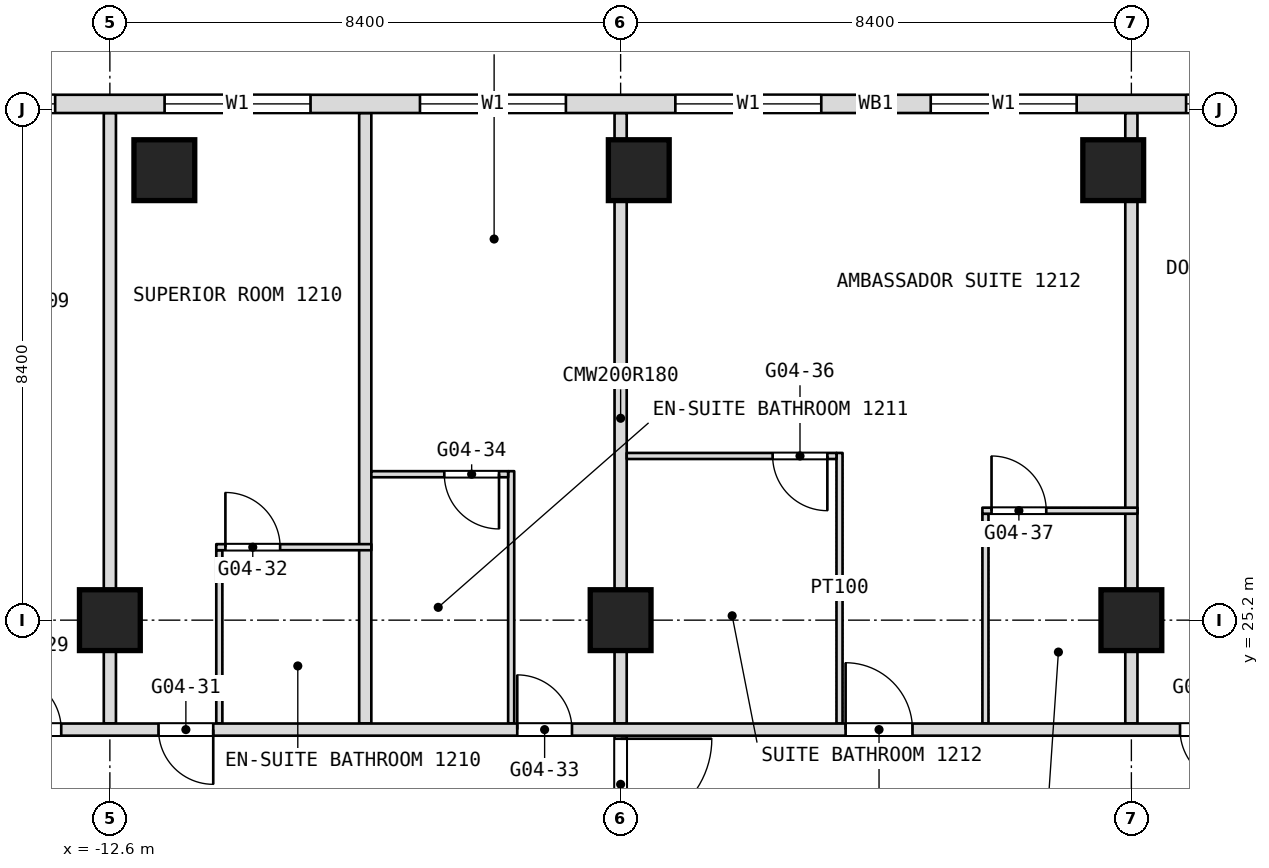
"""IFC4 building model, lengths in metres.
Left out: names, types, materials, properties, quantities, classifications, styles, units other than length and angle.
Written with IfcOpenShell. Run it as: python <this file> out.ifc"""

import sys

from ifc_helpers import new_model, si_unit, direction, frame, frame_2d, origin, origin_2d, place, context, subcontext, project, spatial, rectangle, extrude, element, fill, save


model = new_model("IFC4")
c1 = context("Model", 3, precision=1e-05, world=origin(), true_north=direction((0.0, 1.0)))
c2 = subcontext(c1, "Body", "Model", "MODEL_VIEW")
j1 = project(units=[si_unit("LENGTHUNIT", "METRE"), si_unit("PLANEANGLEUNIT", "RADIAN")], contexts=[c1])
p1 = place(None, origin())
s1 = spatial("IfcSite", under=j1, at=p1, CompositionType="ELEMENT")
p2 = place(p1, origin())
s2 = spatial("IfcBuilding", under=s1, at=p2, CompositionType="ELEMENT")
p3 = place(p2, frame((0.0, 0.0, 58.1)))
s3 = spatial("IfcBuildingStorey", under=s2, at=p3, CompositionType="ELEMENT", Elevation=58.1)
for number, where, z_axis, x_axis in (
    (1, (-12.6, 25.2, 0.0), (0.0, 0.0, 1.0), (1.0, 0.0, 0.0)),
    (2, (-4.2, 25.2, 0.0), (0.0, 0.0, 1.0), (1.0, 0.0, 0.0)),
    (3, (4.2, 25.2, 0.0), (0.0, 0.0, 1.0), (1.0, 0.0, 0.0)),
    (4, (-11.704, 32.6, 0.0), (0.0, 0.0, 1.0), (1.0, 0.0, 0.0)),
    (5, (-3.901, 32.6, 0.0), (0.0, 0.0, 1.0), (1.0, 0.0, 0.0)),
    (6, (3.901, 32.6, 0.0), (0.0, 0.0, 1.0), (1.0, 0.0, 0.0)),
):
    element("IfcColumn", number, at=place(p3, frame(where, z_axis=z_axis, x_axis=x_axis)), inside=s3, PredefinedType="COLUMN", context=c2, shape_type="SweptSolid", body=[
        extrude(rectangle(XDim=1.0, YDim=1.0, at=origin_2d()), origin(), (0.0, 0.0, 1.0), 3.6),
    ])
p4 = place(p3, frame((4.2, 23.5, 0.0), z_axis=(0.0, 0.0, 1.0), x_axis=(0.0, 1.0, 0.0)))
e7 = element("IfcWall", 7, at=p4, inside=s3, PredefinedType="PARTITIONING", context=c2, shape_type="SweptSolid", body=[
    extrude(rectangle(XDim=10.04, YDim=0.2, at=frame_2d((5.02, 0.0))), origin(), (0.0, 0.0, 1.0), 3.34),
])
p5 = place(p3, frame((1.8, 23.5, 0.0), z_axis=(0.0, 0.0, 1.0), x_axis=(0.0, 1.0, 0.0)))
e8 = element("IfcWall", 8, at=p5, inside=s3, PredefinedType="PARTITIONING", context=c2, shape_type="SweptSolid", body=[
    extrude(rectangle(XDim=3.45, YDim=0.1, at=frame_2d((1.725, 0.0))), origin(), (0.0, 0.0, 1.0), 3.34),
])
p6 = place(p3, frame((-0.6, 23.5, 0.0), z_axis=(0.0, 0.0, 1.0), x_axis=(0.0, 1.0, 0.0)))
e9 = element("IfcWall", 9, at=p6, inside=s3, PredefinedType="PARTITIONING", context=c2, shape_type="SweptSolid", body=[
    extrude(rectangle(XDim=4.45, YDim=0.1, at=frame_2d((2.225, 0.0))), origin(), (0.0, 0.0, 1.0), 3.34),
])
p7 = place(p3, frame((-4.2, 16.8, 0.0), z_axis=(0.0, 0.0, 1.0), x_axis=(0.0, 1.0, 0.0)))
e10 = element("IfcWall", 10, at=p7, inside=s3, PredefinedType="PARTITIONING", context=c2, shape_type="SweptSolid", body=[
    extrude(rectangle(XDim=6.7, YDim=0.2, at=frame_2d((3.35, 0.0))), origin(), (0.0, 0.0, 1.0), 3.34),
])
p8 = place(p7, frame((0.15, 0.0, 0.0)))
e11 = element("IfcOpeningElement", 11, at=p8, cuts=e10, PredefinedType="OPENING", context=c2, shape_type="SweptSolid", body=[
    extrude(rectangle(XDim=1.5, YDim=2.1, at=frame_2d((0.75, 1.05))), frame((0.0, 0.1, 0.0), z_axis=(0.0, -1.0, 0.0), x_axis=(1.0, 0.0, 0.0)), (0.0, 0.0, 1.0), 0.2),
])
p9 = place(p7, frame((4.95, 0.0, 0.0)))
e12 = element("IfcOpeningElement", 12, at=p9, cuts=e10, PredefinedType="OPENING", context=c2, shape_type="SweptSolid", body=[
    extrude(rectangle(XDim=1.5, YDim=2.1, at=frame_2d((0.75, 1.05))), frame((0.0, 0.1, 0.0), z_axis=(0.0, -1.0, 0.0), x_axis=(1.0, 0.0, 0.0)), (0.0, 0.0, 1.0), 0.2),
])
p10 = place(p3, frame((-4.2, 23.5, 0.0), z_axis=(0.0, 0.0, 1.0), x_axis=(0.0, 1.0, 0.0)))
e13 = element("IfcWall", 13, at=p10, inside=s3, PredefinedType="PARTITIONING", context=c2, shape_type="SweptSolid", body=[
    extrude(rectangle(XDim=10.04, YDim=0.2, at=frame_2d((5.02, 0.0))), origin(), (0.0, 0.0, 1.0), 3.34),
])
p11 = place(p3, frame((-6.0, 23.5, 0.0), z_axis=(0.0, 0.0, 1.0), x_axis=(0.0, 1.0, 0.0)))
e14 = element("IfcWall", 14, at=p11, inside=s3, PredefinedType="PARTITIONING", context=c2, shape_type="SweptSolid", body=[
    extrude(rectangle(XDim=4.15, YDim=0.1, at=frame_2d((2.075, 0.0))), origin(), (0.0, 0.0, 1.0), 3.34),
])
p12 = place(p3, frame((-8.4, 23.5, 0.0), z_axis=(0.0, 0.0, 1.0), x_axis=(0.0, 1.0, 0.0)))
e15 = element("IfcWall", 15, at=p12, inside=s3, PredefinedType="PARTITIONING", context=c2, shape_type="SweptSolid", body=[
    extrude(rectangle(XDim=10.04, YDim=0.2, at=frame_2d((5.02, 0.0))), origin(), (0.0, 0.0, 1.0), 3.34),
])
p13 = place(p3, frame((-10.8, 23.5, 0.0), z_axis=(0.0, 0.0, 1.0), x_axis=(0.0, 1.0, 0.0)))
e16 = element("IfcWall", 16, at=p13, inside=s3, PredefinedType="PARTITIONING", context=c2, shape_type="SweptSolid", body=[
    extrude(rectangle(XDim=2.85, YDim=0.1, at=frame_2d((1.425, 0.0))), origin(), (0.0, 0.0, 1.0), 3.34),
])
p14 = place(p3, frame((-12.6, 23.5, 0.0), z_axis=(0.0, 0.0, 1.0), x_axis=(0.0, 1.0, 0.0)))
e17 = element("IfcWall", 17, at=p14, inside=s3, PredefinedType="PARTITIONING", context=c2, shape_type="SweptSolid", body=[
    extrude(rectangle(XDim=10.04, YDim=0.2, at=frame_2d((5.02, 0.0))), origin(), (0.0, 0.0, 1.0), 3.34),
])
p15 = place(p3, frame((-16.7, 23.4, 0.0), z_axis=(0.0, 0.0, 1.0), x_axis=(1.0, 0.0, 0.0)))
e18 = element("IfcWall", 18, at=p15, inside=s3, PredefinedType="PARTITIONING", context=c2, shape_type="SweptSolid", body=[
    extrude(rectangle(XDim=23.4, YDim=0.2, at=frame_2d((11.7, 0.0))), origin(), (0.0, 0.0, 1.0), 3.34),
])
p16 = place(p15, frame((2.4, 0.0, 0.0)))
e19 = element("IfcOpeningElement", 19, at=p16, cuts=e18, PredefinedType="OPENING", context=c2, shape_type="SweptSolid", body=[
    extrude(rectangle(XDim=0.9, YDim=2.1, at=frame_2d((0.45, 1.05))), frame((0.0, 0.1, 0.0), z_axis=(0.0, -1.0, 0.0), x_axis=(1.0, 0.0, 0.0)), (0.0, 0.0, 1.0), 0.2),
])
p17 = place(p15, frame((4.9, 0.0, 0.0)))
e20 = element("IfcOpeningElement", 20, at=p17, cuts=e18, PredefinedType="OPENING", context=c2, shape_type="SweptSolid", body=[
    extrude(rectangle(XDim=0.9, YDim=2.1, at=frame_2d((0.45, 1.05))), frame((0.0, 0.1, 0.0), z_axis=(0.0, -1.0, 0.0), x_axis=(1.0, 0.0, 0.0)), (0.0, 0.0, 1.0), 0.2),
])
p18 = place(p15, frame((10.8, 0.0, 0.0)))
e21 = element("IfcOpeningElement", 21, at=p18, cuts=e18, PredefinedType="OPENING", context=c2, shape_type="SweptSolid", body=[
    extrude(rectangle(XDim=0.9, YDim=2.1, at=frame_2d((0.45, 1.05))), frame((0.0, 0.1, 0.0), z_axis=(0.0, -1.0, 0.0), x_axis=(1.0, 0.0, 0.0)), (0.0, 0.0, 1.0), 0.2),
])
p19 = place(p15, frame((16.2, 0.0, 0.0)))
e22 = element("IfcOpeningElement", 22, at=p19, cuts=e18, PredefinedType="OPENING", context=c2, shape_type="SweptSolid", body=[
    extrude(rectangle(XDim=1.1, YDim=2.1, at=frame_2d((0.55, 1.05))), frame((0.0, 0.1, 0.0), z_axis=(0.0, -1.0, 0.0), x_axis=(1.0, 0.0, 0.0)), (0.0, 0.0, 1.0), 0.2),
])
p20 = place(p15, frame((21.7, 0.0, 0.0)))
e23 = element("IfcOpeningElement", 23, at=p20, cuts=e18, PredefinedType="OPENING", context=c2, shape_type="SweptSolid", body=[
    extrude(rectangle(XDim=0.9, YDim=2.1, at=frame_2d((0.45, 1.05))), frame((0.0, 0.1, 0.0), z_axis=(0.0, -1.0, 0.0), x_axis=(1.0, 0.0, 0.0)), (0.0, 0.0, 1.0), 0.2),
])
p21 = place(p3, frame((-10.85, 26.4, 0.0), z_axis=(0.0, 0.0, 1.0), x_axis=(1.0, 0.0, 0.0)))
e24 = element("IfcWall", 24, at=p21, inside=s3, PredefinedType="PARTITIONING", context=c2, shape_type="SweptSolid", body=[
    extrude(rectangle(XDim=2.55, YDim=0.1, at=frame_2d((1.275, 0.0))), origin(), (0.0, 0.0, 1.0), 3.34),
])
p22 = place(p21, frame((0.15, 0.0, 0.0)))
e25 = element("IfcOpeningElement", 25, at=p22, cuts=e24, PredefinedType="OPENING", context=c2, shape_type="SweptSolid", body=[
    extrude(rectangle(XDim=0.9, YDim=2.1, at=frame_2d((0.45, 1.05))), frame((0.0, 0.05, 0.0), z_axis=(0.0, -1.0, 0.0), x_axis=(1.0, 0.0, 0.0)), (0.0, 0.0, 1.0), 0.1),
])
p23 = place(p3, frame((1.75, 27.0, 0.0), z_axis=(0.0, 0.0, 1.0), x_axis=(1.0, 0.0, 0.0)))
e26 = element("IfcWall", 26, at=p23, inside=s3, PredefinedType="PARTITIONING", context=c2, shape_type="SweptSolid", body=[
    extrude(rectangle(XDim=2.55, YDim=0.1, at=frame_2d((1.275, 0.0))), origin(), (0.0, 0.0, 1.0), 3.34),
])
p24 = place(p23, frame((0.15, 0.0, 0.0)))
e27 = element("IfcOpeningElement", 27, at=p24, cuts=e26, PredefinedType="OPENING", context=c2, shape_type="SweptSolid", body=[
    extrude(rectangle(XDim=0.9, YDim=2.1, at=frame_2d((0.45, 1.05))), frame((0.0, 0.05, 0.0), z_axis=(0.0, -1.0, 0.0), x_axis=(1.0, 0.0, 0.0)), (0.0, 0.0, 1.0), 0.1),
])
p25 = place(p3, frame((-8.3, 27.6, 0.0), z_axis=(0.0, 0.0, 1.0), x_axis=(1.0, 0.0, 0.0)))
e28 = element("IfcWall", 28, at=p25, inside=s3, PredefinedType="PARTITIONING", context=c2, shape_type="SweptSolid", body=[
    extrude(rectangle(XDim=2.25, YDim=0.1, at=frame_2d((1.125, 0.0))), origin(), (0.0, 0.0, 1.0), 3.34),
])
p26 = place(p25, frame((1.2, 0.0, 0.0)))
e29 = element("IfcOpeningElement", 29, at=p26, cuts=e28, PredefinedType="OPENING", context=c2, shape_type="SweptSolid", body=[
    extrude(rectangle(XDim=0.9, YDim=2.1, at=frame_2d((0.45, 1.05))), frame((0.0, 0.05, 0.0), z_axis=(0.0, -1.0, 0.0), x_axis=(1.0, 0.0, 0.0)), (0.0, 0.0, 1.0), 0.1),
])
p27 = place(p3, frame((-4.1, 27.9, 0.0), z_axis=(0.0, 0.0, 1.0), x_axis=(1.0, 0.0, 0.0)))
e30 = element("IfcWall", 30, at=p27, inside=s3, PredefinedType="PARTITIONING", context=c2, shape_type="SweptSolid", body=[
    extrude(rectangle(XDim=3.45, YDim=0.1, at=frame_2d((1.725, 0.0))), origin(), (0.0, 0.0, 1.0), 3.34),
])
p28 = place(p27, frame((2.4, 0.0, 0.0)))
e31 = element("IfcOpeningElement", 31, at=p28, cuts=e30, PredefinedType="OPENING", context=c2, shape_type="SweptSolid", body=[
    extrude(rectangle(XDim=0.9, YDim=2.1, at=frame_2d((0.45, 1.05))), frame((0.0, 0.05, 0.0), z_axis=(0.0, -1.0, 0.0), x_axis=(1.0, 0.0, 0.0)), (0.0, 0.0, 1.0), 0.1),
])
p29 = place(p3, frame((23.406, 33.69, 0.0), z_axis=(0.0, 0.0, 1.0), x_axis=(-1.0, 0.0, 0.0)))
e32 = element("IfcWall", 32, at=p29, inside=s3, PredefinedType="NOTDEFINED", context=c2, shape_type="SweptSolid", body=[
    extrude(rectangle(XDim=46.812, YDim=0.3, at=frame_2d((23.406, 0.0))), origin(), (0.0, 0.0, 1.0), 3.6),
])
p30 = place(p29, frame((2.186, 0.0, 0.9)))
e33 = element("IfcOpeningElement", 33, at=p30, cuts=e32, PredefinedType="OPENING", context=c2, shape_type="SweptSolid", body=[
    extrude(rectangle(XDim=2.4, YDim=2.1, at=frame_2d((1.2, 1.05))), frame((0.0, 0.15, 0.0), z_axis=(0.0, -1.0, 0.0), x_axis=(1.0, 0.0, 0.0)), (0.0, 0.0, 1.0), 0.3),
])
p31 = place(p29, frame((7.506, 0.0, 0.9)))
e34 = element("IfcOpeningElement", 34, at=p31, cuts=e32, PredefinedType="OPENING", context=c2, shape_type="SweptSolid", body=[
    extrude(rectangle(XDim=2.4, YDim=2.1, at=frame_2d((1.2, 1.05))), frame((0.0, 0.15, 0.0), z_axis=(0.0, -1.0, 0.0), x_axis=(1.0, 0.0, 0.0)), (0.0, 0.0, 1.0), 0.3),
])
p32 = place(p29, frame((11.706, 0.0, 0.9)))
e35 = element("IfcOpeningElement", 35, at=p32, cuts=e32, PredefinedType="OPENING", context=c2, shape_type="SweptSolid", body=[
    extrude(rectangle(XDim=2.4, YDim=2.1, at=frame_2d((1.2, 1.05))), frame((0.0, 0.15, 0.0), z_axis=(0.0, -1.0, 0.0), x_axis=(1.0, 0.0, 0.0)), (0.0, 0.0, 1.0), 0.3),
])
p33 = place(p29, frame((15.906, 0.0, 0.9)))
e36 = element("IfcOpeningElement", 36, at=p33, cuts=e32, PredefinedType="OPENING", context=c2, shape_type="SweptSolid", body=[
    extrude(rectangle(XDim=2.4, YDim=2.1, at=frame_2d((1.2, 1.05))), frame((0.0, 0.15, 0.0), z_axis=(0.0, -1.0, 0.0), x_axis=(1.0, 0.0, 0.0)), (0.0, 0.0, 1.0), 0.3),
])
p34 = place(p29, frame((20.106, 0.0, 0.9)))
e37 = element("IfcOpeningElement", 37, at=p34, cuts=e32, PredefinedType="OPENING", context=c2, shape_type="SweptSolid", body=[
    extrude(rectangle(XDim=2.4, YDim=2.1, at=frame_2d((1.2, 1.05))), frame((0.0, 0.15, 0.0), z_axis=(0.0, -1.0, 0.0), x_axis=(1.0, 0.0, 0.0)), (0.0, 0.0, 1.0), 0.3),
])
p35 = place(p29, frame((24.306, 0.0, 0.9)))
e38 = element("IfcOpeningElement", 38, at=p35, cuts=e32, PredefinedType="OPENING", context=c2, shape_type="SweptSolid", body=[
    extrude(rectangle(XDim=2.4, YDim=2.1, at=frame_2d((1.2, 1.05))), frame((0.0, 0.15, 0.0), z_axis=(0.0, -1.0, 0.0), x_axis=(1.0, 0.0, 0.0)), (0.0, 0.0, 1.0), 0.3),
])
p36 = place(p29, frame((28.506, 0.0, 0.9)))
e39 = element("IfcOpeningElement", 39, at=p36, cuts=e32, PredefinedType="OPENING", context=c2, shape_type="SweptSolid", body=[
    extrude(rectangle(XDim=2.4, YDim=2.1, at=frame_2d((1.2, 1.05))), frame((0.0, 0.15, 0.0), z_axis=(0.0, -1.0, 0.0), x_axis=(1.0, 0.0, 0.0)), (0.0, 0.0, 1.0), 0.3),
])
p37 = place(p29, frame((32.706, 0.0, 0.9)))
e40 = element("IfcOpeningElement", 40, at=p37, cuts=e32, PredefinedType="OPENING", context=c2, shape_type="SweptSolid", body=[
    extrude(rectangle(XDim=2.4, YDim=2.1, at=frame_2d((1.2, 1.05))), frame((0.0, 0.15, 0.0), z_axis=(0.0, -1.0, 0.0), x_axis=(1.0, 0.0, 0.0)), (0.0, 0.0, 1.0), 0.3),
])
p38 = place(p29, frame((36.906, 0.0, 0.9)))
e41 = element("IfcOpeningElement", 41, at=p38, cuts=e32, PredefinedType="OPENING", context=c2, shape_type="SweptSolid", body=[
    extrude(rectangle(XDim=2.4, YDim=2.1, at=frame_2d((1.2, 1.05))), frame((0.0, 0.15, 0.0), z_axis=(0.0, -1.0, 0.0), x_axis=(1.0, 0.0, 0.0)), (0.0, 0.0, 1.0), 0.3),
])
p39 = place(p29, frame((42.226, 0.0, 0.9)))
e42 = element("IfcOpeningElement", 42, at=p39, cuts=e32, PredefinedType="OPENING", context=c2, shape_type="SweptSolid", body=[
    extrude(rectangle(XDim=2.4, YDim=2.1, at=frame_2d((1.2, 1.05))), frame((0.0, 0.15, 0.0), z_axis=(0.0, -1.0, 0.0), x_axis=(1.0, 0.0, 0.0)), (0.0, 0.0, 1.0), 0.3),
])
p40 = place(p16, origin())
e43 = element("IfcDoor", 43, at=p40, inside=s3, OperationType="SINGLE_SWING_LEFT", PredefinedType="DOOR", context=c2, shape_type="SweptSolid", body=[
    extrude(rectangle(XDim=0.9, YDim=2.1, at=frame_2d((0.45, 1.05))), frame((0.0, 0.025, 0.0), z_axis=(0.0, -1.0, 0.0), x_axis=(1.0, 0.0, 0.0)), (0.0, 0.0, 1.0), 0.05),
])
fill(e19, e43)
p41 = place(p17, origin())
e44 = element("IfcDoor", 44, at=p41, inside=s3, OperationType="SINGLE_SWING_RIGHT", PredefinedType="DOOR", context=c2, shape_type="SweptSolid", body=[
    extrude(rectangle(XDim=0.9, YDim=2.1, at=frame_2d((0.45, 1.05))), frame((0.0, 0.025, 0.0), z_axis=(0.0, -1.0, 0.0), x_axis=(1.0, 0.0, 0.0)), (0.0, 0.0, 1.0), 0.05),
])
fill(e20, e44)
p42 = place(p18, origin())
e45 = element("IfcDoor", 45, at=p42, inside=s3, OperationType="SINGLE_SWING_LEFT", PredefinedType="DOOR", context=c2, shape_type="SweptSolid", body=[
    extrude(rectangle(XDim=0.9, YDim=2.1, at=frame_2d((0.45, 1.05))), frame((0.0, 0.025, 0.0), z_axis=(0.0, -1.0, 0.0), x_axis=(1.0, 0.0, 0.0)), (0.0, 0.0, 1.0), 0.05),
])
fill(e21, e45)
p43 = place(p19, origin())
e46 = element("IfcDoor", 46, at=p43, inside=s3, OperationType="SINGLE_SWING_LEFT", PredefinedType="DOOR", context=c2, shape_type="SweptSolid", body=[
    extrude(rectangle(XDim=1.1, YDim=2.1, at=frame_2d((0.55, 1.05))), frame((0.0, 0.025, 0.0), z_axis=(0.0, -1.0, 0.0), x_axis=(1.0, 0.0, 0.0)), (0.0, 0.0, 1.0), 0.05),
])
fill(e22, e46)
p44 = place(p20, origin())
e47 = element("IfcDoor", 47, at=p44, inside=s3, OperationType="SINGLE_SWING_RIGHT", PredefinedType="DOOR", context=c2, shape_type="SweptSolid", body=[
    extrude(rectangle(XDim=0.9, YDim=2.1, at=frame_2d((0.45, 1.05))), frame((0.0, 0.025, 0.0), z_axis=(0.0, -1.0, 0.0), x_axis=(1.0, 0.0, 0.0)), (0.0, 0.0, 1.0), 0.05),
])
fill(e23, e47)
p45 = place(p22, origin())
e48 = element("IfcDoor", 48, at=p45, inside=s3, OperationType="SINGLE_SWING_RIGHT", PredefinedType="DOOR", context=c2, shape_type="SweptSolid", body=[
    extrude(rectangle(XDim=0.9, YDim=2.1, at=frame_2d((0.45, 1.05))), frame((0.0, 0.025, 0.0), z_axis=(0.0, -1.0, 0.0), x_axis=(1.0, 0.0, 0.0)), (0.0, 0.0, 1.0), 0.05),
])
fill(e25, e48)
p46 = place(p24, origin())
e49 = element("IfcDoor", 49, at=p46, inside=s3, OperationType="SINGLE_SWING_RIGHT", PredefinedType="DOOR", context=c2, shape_type="SweptSolid", body=[
    extrude(rectangle(XDim=0.9, YDim=2.1, at=frame_2d((0.45, 1.05))), frame((0.0, 0.025, 0.0), z_axis=(0.0, -1.0, 0.0), x_axis=(1.0, 0.0, 0.0)), (0.0, 0.0, 1.0), 0.05),
])
fill(e27, e49)
p47 = place(p26, origin())
e50 = element("IfcDoor", 50, at=p47, inside=s3, OperationType="SINGLE_SWING_LEFT", PredefinedType="DOOR", context=c2, shape_type="SweptSolid", body=[
    extrude(rectangle(XDim=0.9, YDim=2.1, at=frame_2d((0.45, 1.05))), frame((0.0, 0.025, 0.0), z_axis=(0.0, -1.0, 0.0), x_axis=(1.0, 0.0, 0.0)), (0.0, 0.0, 1.0), 0.05),
])
fill(e29, e50)
p48 = place(p28, origin())
e51 = element("IfcDoor", 51, at=p48, inside=s3, OperationType="SINGLE_SWING_LEFT", PredefinedType="DOOR", context=c2, shape_type="SweptSolid", body=[
    extrude(rectangle(XDim=0.9, YDim=2.1, at=frame_2d((0.45, 1.05))), frame((0.0, 0.025, 0.0), z_axis=(0.0, -1.0, 0.0), x_axis=(1.0, 0.0, 0.0)), (0.0, 0.0, 1.0), 0.05),
])
fill(e31, e51)
p49 = place(p33, origin())
e52 = element("IfcWindow", 52, at=p49, inside=s3, PartitioningType="SINGLE_PANEL", PredefinedType="WINDOW", context=c2, shape_type="SweptSolid", body=[
    extrude(rectangle(XDim=2.4, YDim=2.1, at=frame_2d((1.2, 1.05))), frame((0.0, 0.03, 0.0), z_axis=(0.0, -1.0, 0.0), x_axis=(1.0, 0.0, 0.0)), (0.0, 0.0, 1.0), 0.06),
])
fill(e36, e52)
p50 = place(p34, origin())
e53 = element("IfcWindow", 53, at=p50, inside=s3, PartitioningType="SINGLE_PANEL", PredefinedType="WINDOW", context=c2, shape_type="SweptSolid", body=[
    extrude(rectangle(XDim=2.4, YDim=2.1, at=frame_2d((1.2, 1.05))), frame((0.0, 0.03, 0.0), z_axis=(0.0, -1.0, 0.0), x_axis=(1.0, 0.0, 0.0)), (0.0, 0.0, 1.0), 0.06),
])
fill(e37, e53)
p51 = place(p35, origin())
e54 = element("IfcWindow", 54, at=p51, inside=s3, PartitioningType="SINGLE_PANEL", PredefinedType="WINDOW", context=c2, shape_type="SweptSolid", body=[
    extrude(rectangle(XDim=2.4, YDim=2.1, at=frame_2d((1.2, 1.05))), frame((0.0, 0.03, 0.0), z_axis=(0.0, -1.0, 0.0), x_axis=(1.0, 0.0, 0.0)), (0.0, 0.0, 1.0), 0.06),
])
fill(e38, e54)
p52 = place(p36, origin())
e55 = element("IfcWindow", 55, at=p52, inside=s3, PartitioningType="SINGLE_PANEL", PredefinedType="WINDOW", context=c2, shape_type="SweptSolid", body=[
    extrude(rectangle(XDim=2.4, YDim=2.1, at=frame_2d((1.2, 1.05))), frame((0.0, 0.03, 0.0), z_axis=(0.0, -1.0, 0.0), x_axis=(1.0, 0.0, 0.0)), (0.0, 0.0, 1.0), 0.06),
])
fill(e39, e55)
p53 = place(p37, origin())
e56 = element("IfcWindow", 56, at=p53, inside=s3, PartitioningType="SINGLE_PANEL", PredefinedType="WINDOW", context=c2, shape_type="SweptSolid", body=[
    extrude(rectangle(XDim=2.4, YDim=2.1, at=frame_2d((1.2, 1.05))), frame((0.0, 0.03, 0.0), z_axis=(0.0, -1.0, 0.0), x_axis=(1.0, 0.0, 0.0)), (0.0, 0.0, 1.0), 0.06),
])
fill(e40, e56)
p54 = place(p38, origin())
e57 = element("IfcWindow", 57, at=p54, inside=s3, PartitioningType="SINGLE_PANEL", PredefinedType="WINDOW", context=c2, shape_type="SweptSolid", body=[
    extrude(rectangle(XDim=2.4, YDim=2.1, at=frame_2d((1.2, 1.05))), frame((0.0, 0.03, 0.0), z_axis=(0.0, -1.0, 0.0), x_axis=(1.0, 0.0, 0.0)), (0.0, 0.0, 1.0), 0.06),
])
fill(e41, e57)
p55 = place(p9, origin())
e58 = element("IfcDoor", 58, at=p55, inside=s3, OperationType="DOUBLE_DOOR_DOUBLE_SWING", PredefinedType="DOOR", context=c2, shape_type="SweptSolid", body=[
    extrude(rectangle(XDim=1.5, YDim=2.1, at=frame_2d((0.75, 1.05))), frame((0.0, 0.025, 0.0), z_axis=(0.0, -1.0, 0.0), x_axis=(1.0, 0.0, 0.0)), (0.0, 0.0, 1.0), 0.05),
])
fill(e12, e58)
save(model, sys.argv[1])
